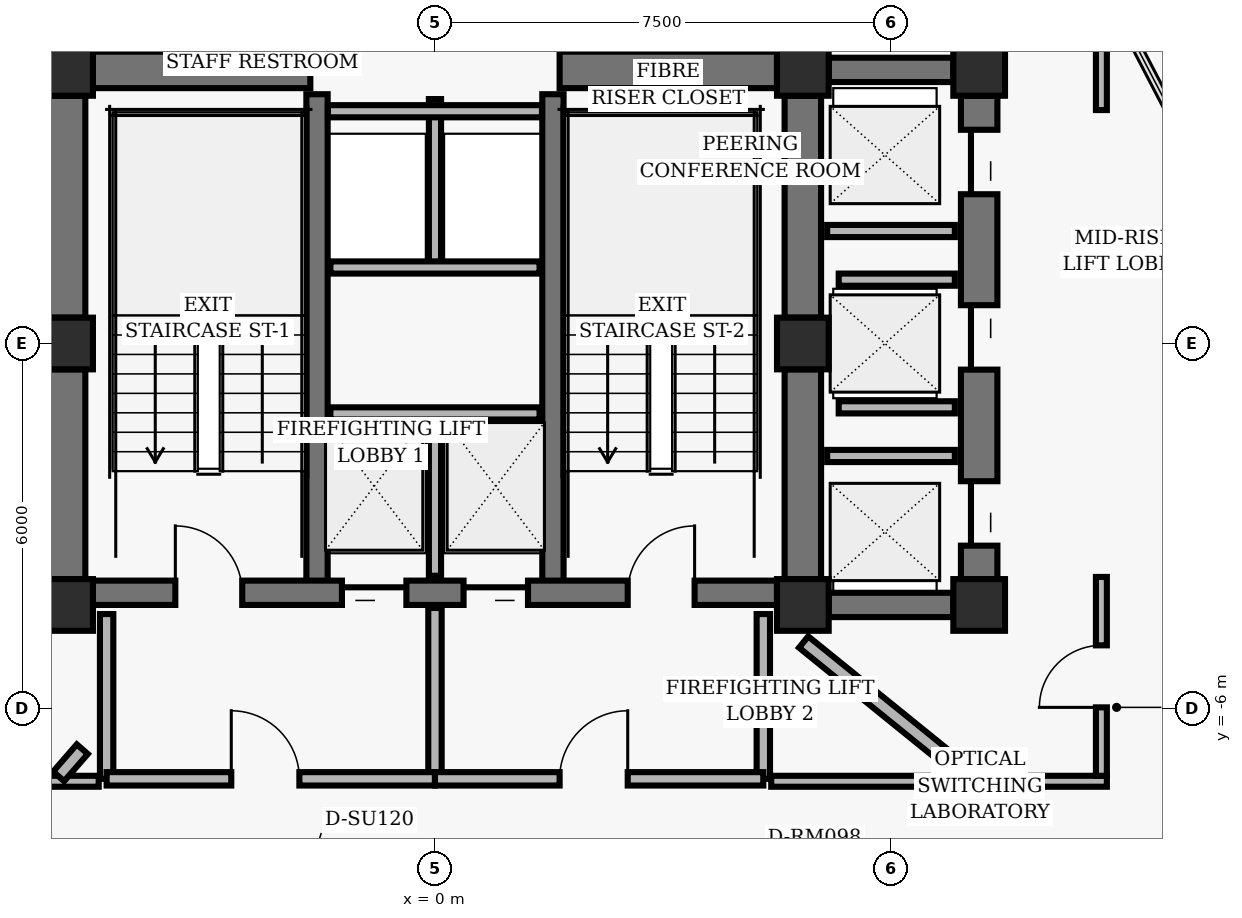
"""IFC4 building model, lengths in metres.
Left out: names, types, materials, properties, quantities, classifications, styles, units other than length and angle.
Written with IfcOpenShell. Run it as: python <this file> out.ifc"""

import sys

from ifc_helpers import new_model, si_unit, direction, frame, frame_2d, origin, origin_2d, place, context, subcontext, project, spatial, rectangle, hollow_rectangle, extrude, element, fill, save


model = new_model("IFC4")
c1 = context("Model", 3, precision=1e-05, world=origin(), true_north=direction((0.0, 1.0)))
c2 = subcontext(c1, "Body", "Model", "MODEL_VIEW")
j1 = project(units=[si_unit("LENGTHUNIT", "METRE"), si_unit("PLANEANGLEUNIT", "RADIAN")], contexts=[c1])
p1 = place(None, origin())
s1 = spatial("IfcSite", under=j1, at=p1, CompositionType="ELEMENT")
p2 = place(p1, origin())
s2 = spatial("IfcBuilding", under=s1, at=p2, CompositionType="ELEMENT")
p3 = place(p2, frame((0.0, 0.0, 132.0)))
s3 = spatial("IfcBuildingStorey", under=s2, at=p3, CompositionType="ELEMENT", Elevation=132.0)
for number, where, z_axis, x_axis in (
    (1, (-6.05, 4.5, 0.0), (0.0, 0.0, 1.0), (1.0, 0.0, 0.0)),
    (2, (6.05, 4.5, 0.0), (0.0, 0.0, 1.0), (1.0, 0.0, 0.0)),
    (3, (-6.05, 0.0, 0.0), (0.0, 0.0, 1.0), (1.0, 0.0, 0.0)),
    (4, (6.05, 0.0, 0.0), (0.0, 0.0, 1.0), (1.0, 0.0, 0.0)),
    (5, (-6.05, -4.3, 0.0), (0.0, 0.0, 1.0), (1.0, 0.0, 0.0)),
    (6, (6.05, -4.3, 0.0), (0.0, 0.0, 1.0), (1.0, 0.0, 0.0)),
    (7, (8.95, 4.5, 0.0), (0.0, 0.0, 1.0), (1.0, 0.0, 0.0)),
    (8, (8.95, -4.3, 0.0), (0.0, 0.0, 1.0), (1.0, 0.0, 0.0)),
):
    element("IfcColumn", number, at=place(p3, frame(where, z_axis=z_axis, x_axis=x_axis)), inside=s3, PredefinedType="COLUMN", context=c2, shape_type="SweptSolid", body=[
        extrude(hollow_rectangle(XDim=0.85, YDim=0.85, WallThickness=0.055, InnerFilletRadius=0.02, OuterFilletRadius=0.04, at=origin_2d()), origin(), (0.0, 0.0, 1.0), 3.04),
    ])
p4 = place(p3, frame((-6.05, 0.425, 0.0), z_axis=(0.0, 0.0, 1.0), x_axis=(0.0, 1.0, 0.0)))
e9 = element("IfcWall", 9, at=p4, inside=s3, PredefinedType="SHEAR", context=c2, shape_type="SweptSolid", body=[
    extrude(rectangle(XDim=3.65, YDim=0.6, at=frame_2d((1.825, 0.0))), origin(), (0.0, 0.0, 1.0), 2.788),
])
p5 = place(p3, frame((-6.05, -3.875, 0.0), z_axis=(0.0, 0.0, 1.0), x_axis=(0.0, 1.0, 0.0)))
e10 = element("IfcWall", 10, at=p5, inside=s3, PredefinedType="SHEAR", context=c2, shape_type="SweptSolid", body=[
    extrude(rectangle(XDim=3.45, YDim=0.6, at=frame_2d((1.725, 0.0))), origin(), (0.0, 0.0, 1.0), 2.788),
])
p6 = place(p3, frame((6.05, 0.425, 0.0), z_axis=(0.0, 0.0, 1.0), x_axis=(0.0, 1.0, 0.0)))
e11 = element("IfcWall", 11, at=p6, inside=s3, PredefinedType="SHEAR", context=c2, shape_type="SweptSolid", body=[
    extrude(rectangle(XDim=3.65, YDim=0.6, at=frame_2d((1.825, 0.0))), origin(), (0.0, 0.0, 1.0), 2.788),
])
p7 = place(p3, frame((6.05, -3.875, 0.0), z_axis=(0.0, 0.0, 1.0), x_axis=(0.0, 1.0, 0.0)))
e12 = element("IfcWall", 12, at=p7, inside=s3, PredefinedType="SHEAR", context=c2, shape_type="SweptSolid", body=[
    extrude(rectangle(XDim=3.45, YDim=0.6, at=frame_2d((1.725, 0.0))), origin(), (0.0, 0.0, 1.0), 2.788),
])
for number, where, z_axis, x_axis in (
    (13, (-1.94, -4.1, 0.0), (0.0, 0.0, 1.0), (0.0, 1.0, 0.0)),
    (14, (1.94, -4.1, 0.0), (0.0, 0.0, 1.0), (0.0, 1.0, 0.0)),
):
    element("IfcWall", number, at=place(p3, frame(where, z_axis=z_axis, x_axis=x_axis)), inside=s3, PredefinedType="SHEAR", context=c2, shape_type="SweptSolid", body=[
        extrude(rectangle(XDim=8.2, YDim=0.35, at=frame_2d((4.1, 0.0))), origin(), (0.0, 0.0, 1.0), 2.788),
    ])
p8 = place(p3, frame((-5.625, -4.1, 0.0), z_axis=(0.0, 0.0, 1.0), x_axis=(1.0, 0.0, 0.0)))
e15 = element("IfcWall", 15, at=p8, inside=s3, PredefinedType="SHEAR", context=c2, shape_type="SweptSolid", body=[
    extrude(rectangle(XDim=11.25, YDim=0.4, at=frame_2d((5.625, 0.0))), origin(), (0.0, 0.0, 1.0), 2.788),
])
p9 = place(p8, frame((1.355, 0.0, 0.0)))
e16 = element("IfcOpeningElement", 16, at=p9, cuts=e15, PredefinedType="OPENING", context=c2, shape_type="SweptSolid", body=[
    extrude(rectangle(XDim=1.1, YDim=2.04, at=frame_2d((0.55, 1.02))), frame((0.0, 0.21, 0.0), z_axis=(0.0, -1.0, 0.0), x_axis=(1.0, 0.0, 0.0)), (0.0, 0.0, 1.0), 0.42),
])
p10 = place(p8, frame((8.795, 0.0, 0.0)))
e17 = element("IfcOpeningElement", 17, at=p10, cuts=e15, PredefinedType="OPENING", context=c2, shape_type="SweptSolid", body=[
    extrude(rectangle(XDim=1.1, YDim=2.04, at=frame_2d((0.55, 1.02))), frame((0.0, 0.21, 0.0), z_axis=(0.0, -1.0, 0.0), x_axis=(1.0, 0.0, 0.0)), (0.0, 0.0, 1.0), 0.42),
])
p11 = place(p8, frame((4.095, 0.0, 0.0)))
e18 = element("IfcOpeningElement", 18, at=p11, cuts=e15, PredefinedType="OPENING", context=c2, shape_type="SweptSolid", body=[
    extrude(rectangle(XDim=1.06, YDim=2.04, at=frame_2d((0.53, 1.02))), frame((0.0, 0.21, 0.0), z_axis=(0.0, -1.0, 0.0), x_axis=(1.0, 0.0, 0.0)), (0.0, 0.0, 1.0), 0.42),
])
p12 = place(p8, frame((6.095, 0.0, 0.0)))
e19 = element("IfcOpeningElement", 19, at=p12, cuts=e15, PredefinedType="OPENING", context=c2, shape_type="SweptSolid", body=[
    extrude(rectangle(XDim=1.06, YDim=2.04, at=frame_2d((0.53, 1.02))), frame((0.0, 0.21, 0.0), z_axis=(0.0, -1.0, 0.0), x_axis=(1.0, 0.0, 0.0)), (0.0, 0.0, 1.0), 0.42),
])
for number, where, z_axis, x_axis in (
    (20, (-5.625, 4.5, 0.0), (0.0, 0.0, 1.0), (1.0, 0.0, 0.0)),
    (21, (2.05, 4.5, 0.0), (0.0, 0.0, 1.0), (1.0, 0.0, 0.0)),
):
    element("IfcWall", number, at=place(p3, frame(where, z_axis=z_axis, x_axis=x_axis)), inside=s3, PredefinedType="SHEAR", context=c2, shape_type="SweptSolid", body=[
        extrude(rectangle(XDim=3.575, YDim=0.6, at=frame_2d((1.788, 0.0))), origin(), (0.0, 0.0, 1.0), 2.788),
    ])
p13 = place(p3, frame((8.95, -3.875, 0.0), z_axis=(0.0, 0.0, 1.0), x_axis=(0.0, 1.0, 0.0)))
e22 = element("IfcWall", 22, at=p13, inside=s3, PredefinedType="SHEAR", context=c2, shape_type="SweptSolid", body=[
    extrude(rectangle(XDim=7.95, YDim=0.6, at=frame_2d((3.975, 0.0))), origin(), (0.0, 0.0, 1.0), 2.788),
])
p14 = place(p13, frame((0.55, 0.0, 0.0)))
e23 = element("IfcOpeningElement", 23, at=p14, cuts=e22, PredefinedType="OPENING", context=c2, shape_type="SweptSolid", body=[
    extrude(rectangle(XDim=1.06, YDim=2.04, at=frame_2d((0.53, 1.02))), frame((0.0, 0.31, 0.0), z_axis=(0.0, -1.0, 0.0), x_axis=(1.0, 0.0, 0.0)), (0.0, 0.0, 1.0), 0.62),
])
p15 = place(p13, frame((3.445, 0.0, 0.0)))
e24 = element("IfcOpeningElement", 24, at=p15, cuts=e22, PredefinedType="OPENING", context=c2, shape_type="SweptSolid", body=[
    extrude(rectangle(XDim=1.06, YDim=2.04, at=frame_2d((0.53, 1.02))), frame((0.0, 0.31, 0.0), z_axis=(0.0, -1.0, 0.0), x_axis=(1.0, 0.0, 0.0)), (0.0, 0.0, 1.0), 0.62),
])
p16 = place(p13, frame((6.33, 0.0, 0.0)))
e25 = element("IfcOpeningElement", 25, at=p16, cuts=e22, PredefinedType="OPENING", context=c2, shape_type="SweptSolid", body=[
    extrude(rectangle(XDim=1.06, YDim=2.04, at=frame_2d((0.53, 1.02))), frame((0.0, 0.31, 0.0), z_axis=(0.0, -1.0, 0.0), x_axis=(1.0, 0.0, 0.0)), (0.0, 0.0, 1.0), 0.62),
])
for number, where, z_axis, x_axis in (
    (26, (6.475, 4.5, 0.0), (0.0, 0.0, 1.0), (1.0, 0.0, 0.0)),
    (27, (6.475, -4.3, 0.0), (0.0, 0.0, 1.0), (1.0, 0.0, 0.0)),
):
    element("IfcWall", number, at=place(p3, frame(where, z_axis=z_axis, x_axis=x_axis)), inside=s3, PredefinedType="SHEAR", context=c2, shape_type="SweptSolid", body=[
        extrude(rectangle(XDim=2.05, YDim=0.4, at=frame_2d((1.025, 0.0))), origin(), (0.0, 0.0, 1.0), 2.788),
    ])
p17 = place(p3, frame((0.0, -3.82, 0.0), z_axis=(0.0, 0.0, 1.0), x_axis=(0.0, 1.0, 0.0)))
e28 = element("IfcWall", 28, at=p17, inside=s3, PredefinedType="PARTITIONING", context=c2, shape_type="SweptSolid", body=[
    extrude(rectangle(XDim=2.67, YDim=0.2, at=frame_2d((1.335, 0.0))), origin(), (0.0, 0.0, 1.0), 2.763),
])
p18 = place(p3, frame((-1.72, -1.15, 0.0), z_axis=(0.0, 0.0, 1.0), x_axis=(1.0, 0.0, 0.0)))
e29 = element("IfcWall", 29, at=p18, inside=s3, PredefinedType="PARTITIONING", context=c2, shape_type="SweptSolid", body=[
    extrude(rectangle(XDim=3.44, YDim=0.2, at=frame_2d((1.72, 0.0))), origin(), (0.0, 0.0, 1.0), 2.763),
])
for number, where, z_axis, x_axis in (
    (30, (-5.4, -7.16, 0.0), (0.0, 0.0, 1.0), (0.0, 1.0, 0.0)),
    (31, (5.4, -7.16, 0.0), (0.0, 0.0, 1.0), (0.0, 1.0, 0.0)),
):
    element("IfcWall", number, at=place(p3, frame(where, z_axis=z_axis, x_axis=x_axis)), inside=s3, PredefinedType="PARTITIONING", context=c2, shape_type="SweptSolid", body=[
        extrude(rectangle(XDim=2.71, YDim=0.22, at=frame_2d((1.355, 0.0))), origin(), (0.0, 0.0, 1.0), 2.763),
    ])
p19 = place(p3, frame((0.0, -7.16, 0.0), z_axis=(0.0, 0.0, 1.0), x_axis=(0.0, 1.0, 0.0)))
e32 = element("IfcWall", 32, at=p19, inside=s3, PredefinedType="PARTITIONING", context=c2, shape_type="SweptSolid", body=[
    extrude(rectangle(XDim=2.81, YDim=0.22, at=frame_2d((1.405, 0.0))), origin(), (0.0, 0.0, 1.0), 2.763),
])
p20 = place(p3, frame((-5.4, -7.16, 0.0), z_axis=(0.0, 0.0, 1.0), x_axis=(1.0, 0.0, 0.0)))
e33 = element("IfcWall", 33, at=p20, inside=s3, PredefinedType="PARTITIONING", context=c2, shape_type="SweptSolid", body=[
    extrude(rectangle(XDim=5.4, YDim=0.22, at=frame_2d((2.7, 0.0))), origin(), (0.0, 0.0, 1.0), 2.33),
])
p21 = place(p20, frame((2.05, 0.0, 0.0)))
e34 = element("IfcOpeningElement", 34, at=p21, cuts=e33, PredefinedType="OPENING", context=c2, shape_type="SweptSolid", body=[
    extrude(rectangle(XDim=1.12, YDim=2.02, at=frame_2d((0.56, 1.01))), frame((0.0, 0.12, 0.0), z_axis=(0.0, -1.0, 0.0), x_axis=(1.0, 0.0, 0.0)), (0.0, 0.0, 1.0), 0.24),
])
p22 = place(p3, frame((0.0, -7.16, 0.0), z_axis=(0.0, 0.0, 1.0), x_axis=(1.0, 0.0, 0.0)))
e35 = element("IfcWall", 35, at=p22, inside=s3, PredefinedType="PARTITIONING", context=c2, shape_type="SweptSolid", body=[
    extrude(rectangle(XDim=5.4, YDim=0.22, at=frame_2d((2.7, 0.0))), origin(), (0.0, 0.0, 1.0), 2.33),
])
p23 = place(p22, frame((2.05, 0.0, 0.0)))
e36 = element("IfcOpeningElement", 36, at=p23, cuts=e35, PredefinedType="OPENING", context=c2, shape_type="SweptSolid", body=[
    extrude(rectangle(XDim=1.12, YDim=2.02, at=frame_2d((0.56, 1.01))), frame((0.0, 0.12, 0.0), z_axis=(0.0, -1.0, 0.0), x_axis=(1.0, 0.0, 0.0)), (0.0, 0.0, 1.0), 0.24),
])
p24 = place(p3, frame((0.0, 1.25, 0.0), z_axis=(0.0, 0.0, 1.0), x_axis=(0.0, 1.0, 0.0)))
e37 = element("IfcWall", 37, at=p24, inside=s3, PredefinedType="PARTITIONING", context=c2, shape_type="SweptSolid", body=[
    extrude(rectangle(XDim=2.77, YDim=0.2, at=frame_2d((1.385, 0.0))), origin(), (0.0, 0.0, 1.0), 2.763),
])
p25 = place(p3, frame((-1.72, 1.25, 0.0), z_axis=(0.0, 0.0, 1.0), x_axis=(1.0, 0.0, 0.0)))
e38 = element("IfcWall", 38, at=p25, inside=s3, PredefinedType="PARTITIONING", context=c2, shape_type="SweptSolid", body=[
    extrude(rectangle(XDim=3.44, YDim=0.2, at=frame_2d((1.72, 0.0))), origin(), (0.0, 0.0, 1.0), 2.763),
])
p26 = place(p3, frame((-1.76, 3.82, 0.0), z_axis=(0.0, 0.0, 1.0), x_axis=(1.0, 0.0, 0.0)))
e39 = element("IfcWall", 39, at=p26, inside=s3, PredefinedType="PARTITIONING", context=c2, shape_type="SweptSolid", body=[
    extrude(rectangle(XDim=3.52, YDim=0.2, at=frame_2d((1.76, 0.0))), origin(), (0.0, 0.0, 1.0), 2.763),
])
for number, where, z_axis, x_axis in (
    (40, (6.45, -1.85, 0.0), (0.0, 0.0, 1.0), (1.0, 0.0, 0.0)),
    (41, (6.45, 1.85, 0.0), (0.0, 0.0, 1.0), (1.0, 0.0, 0.0)),
):
    element("IfcWall", number, at=place(p3, frame(where, z_axis=z_axis, x_axis=x_axis)), inside=s3, PredefinedType="PARTITIONING", context=c2, shape_type="SweptSolid", body=[
        extrude(rectangle(XDim=2.1, YDim=0.2, at=frame_2d((1.05, 0.0))), origin(), (0.0, 0.0, 1.0), 2.763),
    ])
for number, where, z_axis, x_axis in (
    (42, (6.64, -1.05, 0.0), (0.0, 0.0, 1.0), (1.0, 0.0, 0.0)),
    (43, (6.64, 1.05, 0.0), (0.0, 0.0, 1.0), (1.0, 0.0, 0.0)),
):
    element("IfcWall", number, at=place(p3, frame(where, z_axis=z_axis, x_axis=x_axis)), inside=s3, PredefinedType="PARTITIONING", context=c2, shape_type="SweptSolid", body=[
        extrude(rectangle(XDim=1.91, YDim=0.2, at=frame_2d((0.955, 0.0))), origin(), (0.0, 0.0, 1.0), 2.763),
    ])
p27 = place(p3, frame((10.003, 9.07, 0.0), z_axis=(0.0, 0.0, 1.0), x_axis=(0.461740291408, -0.887015165198, 0.0)))
e44 = element("IfcWall", 44, at=p27, inside=s3, PredefinedType="PARTITIONING", context=c2, shape_type="SweptSolid", body=[
    extrude(rectangle(XDim=9.976, YDim=0.18, at=frame_2d((4.988, 0.0))), origin(), (0.0, 0.0, 1.0), 2.763),
])
p28 = place(p3, frame((5.53, -7.2, 0.0), z_axis=(0.0, 0.0, 1.0), x_axis=(1.0, 0.0, 0.0)))
e45 = element("IfcWall", 45, at=p28, inside=s3, PredefinedType="PARTITIONING", context=c2, shape_type="SweptSolid", body=[
    extrude(rectangle(XDim=5.52, YDim=0.18, at=frame_2d((2.76, 0.0))), origin(), (0.0, 0.0, 1.0), 2.33),
])
p29 = place(p3, frame((10.96, -7.11, 0.0), z_axis=(0.0, 0.0, 1.0), x_axis=(0.0, 1.0, 0.0)))
e46 = element("IfcWall", 46, at=p29, inside=s3, PredefinedType="PARTITIONING", context=c2, shape_type="SweptSolid", body=[
    extrude(rectangle(XDim=3.271, YDim=0.18, at=frame_2d((1.635, 0.0))), origin(), (0.0, 0.0, 1.0), 2.763),
])
p30 = place(p29, frame((1.125, 0.0, 0.0)))
e47 = element("IfcOpeningElement", 47, at=p30, cuts=e46, PredefinedType="OPENING", context=c2, shape_type="SweptSolid", body=[
    extrude(rectangle(XDim=1.02, YDim=2.02, at=frame_2d((0.51, 1.01))), frame((0.0, 0.1, 0.0), z_axis=(0.0, -1.0, 0.0), x_axis=(1.0, 0.0, 0.0)), (0.0, 0.0, 1.0), 0.2),
])
p31 = place(p3, frame((10.96, 3.84, 0.0), z_axis=(0.0, 0.0, 1.0), x_axis=(0.0, 1.0, 0.0)))
e48 = element("IfcWall", 48, at=p31, inside=s3, PredefinedType="PARTITIONING", context=c2, shape_type="SweptSolid", body=[
    extrude(rectangle(XDim=3.271, YDim=0.18, at=frame_2d((1.635, 0.0))), origin(), (0.0, 0.0, 1.0), 2.763),
])
p32 = place(p3, frame((-6.59, -7.2, 0.0), z_axis=(0.0, 0.0, 1.0), x_axis=(1.0, 0.0, 0.0)))
e49 = element("IfcWall", 49, at=p32, inside=s3, PredefinedType="PARTITIONING", context=c2, shape_type="SweptSolid", body=[
    extrude(rectangle(XDim=1.06, YDim=0.18, at=frame_2d((0.53, 0.0))), origin(), (0.0, 0.0, 1.0), 2.33),
])
p33 = place(p3, frame((-5.8, -6.672, 0.0), z_axis=(0.0, 0.0, 1.0), x_axis=(-0.655791573116, -0.754941992891, 0.0)))
e50 = element("IfcWall", 50, at=p33, inside=s3, PredefinedType="PARTITIONING", context=c2, shape_type="SweptSolid", body=[
    extrude(rectangle(XDim=0.594, YDim=0.24, at=frame_2d((0.297, 0.0))), origin(), (0.0, 0.0, 1.0), 2.763),
])
p34 = place(p3, frame((6.063, -4.91, 0.0), z_axis=(0.0, 0.0, 1.0), x_axis=(0.777131535724, -0.629338204929, 0.0)))
e51 = element("IfcWall", 51, at=p34, inside=s3, PredefinedType="PARTITIONING", context=c2, shape_type="SweptSolid", body=[
    extrude(rectangle(XDim=3.512, YDim=0.24, at=frame_2d((1.756, 0.0))), origin(), (0.0, 0.0, 1.0), 2.763),
])
p35 = place(p9, origin())
e52 = element("IfcDoor", 52, at=p35, inside=s3, OperationType="SINGLE_SWING_LEFT", PredefinedType="DOOR", context=c2, shape_type="SweptSolid", body=[
    extrude(rectangle(XDim=1.1, YDim=2.04, at=frame_2d((0.55, 1.02))), frame((0.0, 0.025, 0.0), z_axis=(0.0, -1.0, 0.0), x_axis=(1.0, 0.0, 0.0)), (0.0, 0.0, 1.0), 0.05),
])
fill(e16, e52)
p36 = place(p10, origin())
e53 = element("IfcDoor", 53, at=p36, inside=s3, OperationType="SINGLE_SWING_RIGHT", PredefinedType="DOOR", context=c2, shape_type="SweptSolid", body=[
    extrude(rectangle(XDim=1.1, YDim=2.04, at=frame_2d((0.55, 1.02))), frame((0.0, 0.025, 0.0), z_axis=(0.0, -1.0, 0.0), x_axis=(1.0, 0.0, 0.0)), (0.0, 0.0, 1.0), 0.05),
])
fill(e17, e53)
p37 = place(p11, origin())
e54 = element("IfcDoor", 54, at=p37, inside=s3, OperationType="SLIDING_TO_LEFT", PredefinedType="DOOR", context=c2, shape_type="SweptSolid", body=[
    extrude(rectangle(XDim=1.06, YDim=2.04, at=frame_2d((0.53, 1.02))), frame((0.0, 0.025, 0.0), z_axis=(0.0, -1.0, 0.0), x_axis=(1.0, 0.0, 0.0)), (0.0, 0.0, 1.0), 0.05),
])
fill(e18, e54)
p38 = place(p12, origin())
e55 = element("IfcDoor", 55, at=p38, inside=s3, OperationType="SLIDING_TO_RIGHT", PredefinedType="DOOR", context=c2, shape_type="SweptSolid", body=[
    extrude(rectangle(XDim=1.06, YDim=2.04, at=frame_2d((0.53, 1.02))), frame((0.0, 0.025, 0.0), z_axis=(0.0, -1.0, 0.0), x_axis=(1.0, 0.0, 0.0)), (0.0, 0.0, 1.0), 0.05),
])
fill(e19, e55)
p39 = place(p21, origin())
e56 = element("IfcDoor", 56, at=p39, inside=s3, OperationType="SINGLE_SWING_LEFT", PredefinedType="DOOR", context=c2, shape_type="SweptSolid", body=[
    extrude(rectangle(XDim=1.12, YDim=2.02, at=frame_2d((0.56, 1.01))), frame((0.0, 0.025, 0.0), z_axis=(0.0, -1.0, 0.0), x_axis=(1.0, 0.0, 0.0)), (0.0, 0.0, 1.0), 0.05),
])
fill(e34, e56)
p40 = place(p23, origin())
e57 = element("IfcDoor", 57, at=p40, inside=s3, OperationType="SINGLE_SWING_RIGHT", PredefinedType="DOOR", context=c2, shape_type="SweptSolid", body=[
    extrude(rectangle(XDim=1.12, YDim=2.02, at=frame_2d((0.56, 1.01))), frame((0.0, 0.025, 0.0), z_axis=(0.0, -1.0, 0.0), x_axis=(1.0, 0.0, 0.0)), (0.0, 0.0, 1.0), 0.05),
])
fill(e36, e57)
p41 = place(p14, origin())
e58 = element("IfcDoor", 58, at=p41, inside=s3, OperationType="SLIDING_TO_LEFT", PredefinedType="DOOR", context=c2, shape_type="SweptSolid", body=[
    extrude(rectangle(XDim=1.06, YDim=2.04, at=frame_2d((0.53, 1.02))), frame((0.0, 0.025, 0.0), z_axis=(0.0, -1.0, 0.0), x_axis=(1.0, 0.0, 0.0)), (0.0, 0.0, 1.0), 0.05),
])
fill(e23, e58)
p42 = place(p15, origin())
e59 = element("IfcDoor", 59, at=p42, inside=s3, OperationType="SLIDING_TO_RIGHT", PredefinedType="DOOR", context=c2, shape_type="SweptSolid", body=[
    extrude(rectangle(XDim=1.06, YDim=2.04, at=frame_2d((0.53, 1.02))), frame((0.0, 0.025, 0.0), z_axis=(0.0, -1.0, 0.0), x_axis=(1.0, 0.0, 0.0)), (0.0, 0.0, 1.0), 0.05),
])
fill(e24, e59)
p43 = place(p16, origin())
e60 = element("IfcDoor", 60, at=p43, inside=s3, OperationType="SLIDING_TO_LEFT", PredefinedType="DOOR", context=c2, shape_type="SweptSolid", body=[
    extrude(rectangle(XDim=1.06, YDim=2.04, at=frame_2d((0.53, 1.02))), frame((0.0, 0.025, 0.0), z_axis=(0.0, -1.0, 0.0), x_axis=(1.0, 0.0, 0.0)), (0.0, 0.0, 1.0), 0.05),
])
fill(e25, e60)
p44 = place(p30, origin())
e61 = element("IfcDoor", 61, at=p44, inside=s3, OperationType="SINGLE_SWING_LEFT", PredefinedType="DOOR", context=c2, shape_type="SweptSolid", body=[
    extrude(rectangle(XDim=1.02, YDim=2.02, at=frame_2d((0.51, 1.01))), frame((0.0, 0.025, 0.0), z_axis=(0.0, -1.0, 0.0), x_axis=(1.0, 0.0, 0.0)), (0.0, 0.0, 1.0), 0.05),
])
fill(e47, e61)
save(model, sys.argv[1])
